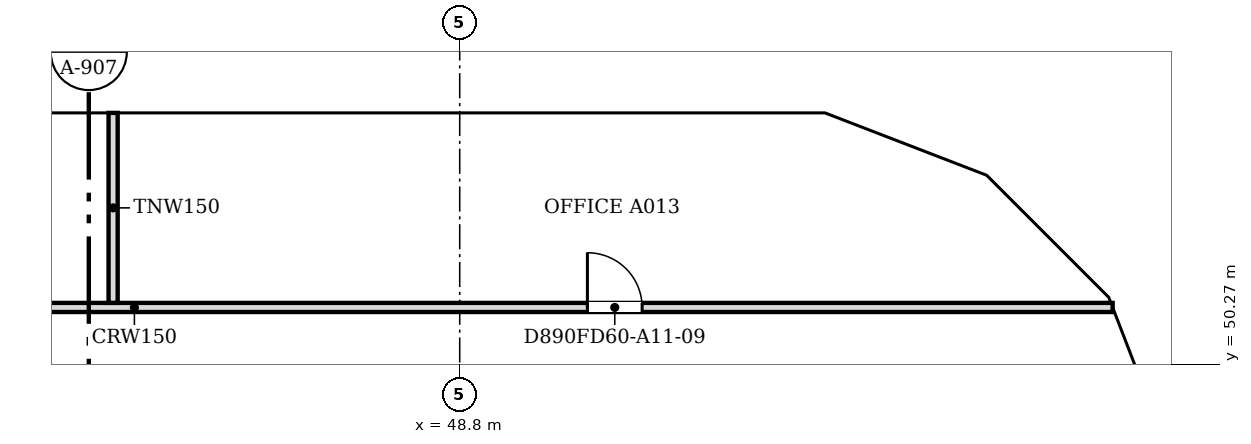
"""IFC4 building model, lengths in metres.
Left out: names, types, materials, properties, quantities, classifications, styles, units other than length and angle.
Written with IfcOpenShell. Run it as: python <this file> out.ifc"""

import sys

from ifc_helpers import new_model, si_unit, direction, frame, frame_2d, origin, place, context, subcontext, project, spatial, polyline, rectangle, outline, extrude, faceted_brep, source, transform, mapped, element, fill, save


model = new_model("IFC4")
c1 = context("Model", 3, precision=1e-05, world=origin(), true_north=direction((0.0, 1.0)))
c2 = subcontext(c1, "Body", "Model", "MODEL_VIEW")
j1 = project(units=[si_unit("LENGTHUNIT", "METRE"), si_unit("PLANEANGLEUNIT", "RADIAN")], contexts=[c1])
p1 = place(None, origin())
s1 = spatial("IfcSite", under=j1, at=p1, CompositionType="ELEMENT")
p2 = place(p1, origin())
s2 = spatial("IfcBuilding", under=s1, at=p2, CompositionType="ELEMENT")
p3 = place(p2, frame((0.0, 0.0, 124.0)))
s3 = spatial("IfcBuildingStorey", under=s2, at=p3, CompositionType="ELEMENT", Elevation=124.0)
m1 = source(origin(), c2, "Body", "Brep", [
    faceted_brep([(0.047, -0.25, 0.0), (2.997, -0.25, 3.8), (0.047, -0.25, 7.6), (0.0, -0.25, 7.541), (0.0, -0.25, 0.059), (0.093, 0.25, 7.54), (2.944, 0.25, 3.868), (2.944, 0.25, 3.732), (0.093, 0.25, 0.06), (2.997, 0.0, 3.8), (0.047, 0.0, 0.0), (0.047, 0.0, 7.6)], [[[0, 1, 2, 3, 4]], [[5, 6, 7, 8]], [[8, 7, 9, 1, 0, 10]], [[6, 5, 11, 2, 1, 9]], [[3, 2, 11]], [[10, 0, 4]], [[8, 10, 4, 3, 11, 5]], [[9, 7, 6]]]),
])
p4 = place(p3, frame((60.767, 48.71, -3.8), z_axis=(0.0, 0.0, 1.0), x_axis=(-0.359901446078, 0.932990326376, 0.0)))
e1 = element("IfcWall", 1, at=p4, inside=s3, PredefinedType="SOLIDWALL", context=c2, shape_type="MappedRepresentation", body=[
    mapped(m1, transform((0.0, 0.0, 0.0), scale=1.0)),
])
m2 = source(origin(), c2, "Body", "SweptSolid", [
    extrude(outline(polyline([(0.247, 0.665), (2.681, 3.8), (0.247, 6.935), (0.247, 0.665)])), frame((0.0, 0.26, 0.0), z_axis=(0.0, -1.0, 0.0), x_axis=(1.0, 0.0, 0.0)), (0.0, 0.0, 1.0), 0.52),
])
p5 = place(p4, origin())
e2 = element("IfcOpeningElement", 2, at=p5, cuts=e1, PredefinedType="OPENING", context=c2, shape_type="MappedRepresentation", body=[
    mapped(m2, transform((0.0, 0.0, 0.0), scale=1.0)),
])
m3 = source(origin(), c2, "Body", "Brep", [
    faceted_brep([(2.944, -0.25, 0.0), (2.997, -0.25, 0.068), (2.997, -0.25, 7.532), (2.944, -0.25, 7.6), (0.0, -0.25, 3.8), (0.053, 0.25, 3.868), (2.891, 0.25, 7.532), (2.891, 0.25, 0.068), (0.053, 0.25, 3.732), (2.944, 0.0, 0.0), (2.944, 0.0, 7.6), (0.0, 0.0, 3.8)], [[[0, 1, 2, 3, 4]], [[5, 6, 7, 8]], [[1, 0, 9]], [[10, 3, 2]], [[6, 5, 11, 4, 3, 10]], [[8, 7, 9, 0, 4, 11]], [[8, 11, 5]], [[1, 9, 7, 6, 10, 2]]]),
])
p6 = place(p3, frame((59.688, 51.506, -3.8), z_axis=(0.0, 0.0, 1.0), x_axis=(-0.707106781187, 0.707106781187, 0.0)))
e3 = element("IfcWall", 3, at=p6, inside=s3, PredefinedType="SOLIDWALL", context=c2, shape_type="MappedRepresentation", body=[
    mapped(m3, transform((0.0, 0.0, 0.0), scale=1.0)),
])
m4 = source(origin(), c2, "Body", "SweptSolid", [
    extrude(outline(polyline([(2.744, 6.934), (0.316, 3.8), (2.744, 0.666), (2.744, 6.934)])), frame((0.0, 0.26, 0.0), z_axis=(0.0, -1.0, 0.0), x_axis=(1.0, 0.0, 0.0)), (0.0, 0.0, 1.0), 0.52),
])
p7 = place(p6, origin())
e4 = element("IfcOpeningElement", 4, at=p7, cuts=e3, PredefinedType="OPENING", context=c2, shape_type="MappedRepresentation", body=[
    mapped(m4, transform((0.0, 0.0, 0.0), scale=1.0)),
])
m5 = source(origin(), c2, "Body", "Brep", [
    faceted_brep([(0.053, -0.25, 0.0), (3.003, -0.25, 3.8), (0.053, -0.25, 7.6), (0.0, -0.25, 7.532), (0.0, -0.25, 0.068), (0.106, 0.25, 7.532), (2.957, 0.25, 3.86), (2.957, 0.25, 3.74), (0.106, 0.25, 0.068), (3.003, 0.0, 3.8), (0.053, 0.0, 0.0), (0.053, 0.0, 7.6)], [[[0, 1, 2, 3, 4]], [[5, 6, 7, 8]], [[8, 7, 9, 1, 0, 10]], [[6, 5, 11, 2, 1, 9]], [[3, 2, 11]], [[10, 0, 4]], [[8, 10, 4, 3, 11, 5]], [[9, 7, 6]]]),
])
p8 = place(p3, frame((57.656, 53.569, -3.8), z_axis=(0.0, 0.0, 1.0), x_axis=(-0.933007896601, 0.359855894603, 0.0)))
e5 = element("IfcWall", 5, at=p8, inside=s3, PredefinedType="SOLIDWALL", context=c2, shape_type="MappedRepresentation", body=[
    mapped(m5, transform((0.0, 0.0, 0.0), scale=1.0)),
])
m6 = source(origin(), c2, "Body", "SweptSolid", [
    extrude(outline(polyline([(0.253, 0.665), (2.687, 3.8), (0.253, 6.935), (0.253, 0.665)])), frame((0.0, 0.26, 0.0), z_axis=(0.0, -1.0, 0.0), x_axis=(1.0, 0.0, 0.0)), (0.0, 0.0, 1.0), 0.52),
])
p9 = place(p8, origin())
e6 = element("IfcOpeningElement", 6, at=p9, cuts=e5, PredefinedType="OPENING", context=c2, shape_type="MappedRepresentation", body=[
    mapped(m6, transform((0.0, 0.0, 0.0), scale=1.0)),
])
m7 = source(origin(), c2, "Body", "Brep", [
    faceted_brep([(3.003, -0.25, 0.0), (6.053, -0.25, 3.8), (3.003, -0.25, 7.6), (0.0, -0.25, 3.8), (0.047, 0.25, 3.859), (3.003, 0.25, 7.6), (6.053, 0.25, 3.8), (3.003, 0.25, 0.0), (0.047, 0.25, 3.741), (0.0, 0.0, 3.8)], [[[0, 1, 2, 3]], [[4, 5, 6, 7, 8]], [[7, 6, 1, 0]], [[6, 5, 2, 1]], [[5, 4, 9, 3, 2]], [[8, 7, 0, 3, 9]], [[8, 9, 4]]]),
])
p10 = place(p3, frame((54.854, 54.65, -3.8), z_axis=(0.0, 0.0, 1.0), x_axis=(-1.0, 0.0, 0.0)))
e7 = element("IfcWall", 7, at=p10, inside=s3, PredefinedType="SOLIDWALL", context=c2, shape_type="MappedRepresentation", body=[
    mapped(m7, transform((0.0, 0.0, 0.0), scale=1.0)),
])
m8 = source(origin(), c2, "Body", "SweptSolid", [
    extrude(outline(polyline([(3.005, 0.401), (5.733, 3.8), (3.005, 7.199), (0.319, 3.8), (3.005, 0.401)])), frame((0.0, 0.26, 0.0), z_axis=(0.0, -1.0, 0.0), x_axis=(1.0, 0.0, 0.0)), (0.0, 0.0, 1.0), 0.52),
])
p11 = place(p10, origin())
e8 = element("IfcOpeningElement", 8, at=p11, cuts=e7, PredefinedType="OPENING", context=c2, shape_type="MappedRepresentation", body=[
    mapped(m8, transform((0.0, 0.0, 0.0), scale=1.0)),
])
m9 = source(origin(), c2, "Body", "SweptSolid", [
    extrude(outline(polyline([(3.05, 0.0), (6.1, 3.8), (3.05, 7.6), (0.0, 3.8), (3.05, 0.0)])), frame((0.0, 0.25, 0.0), z_axis=(0.0, -1.0, 0.0), x_axis=(1.0, 0.0, 0.0)), (0.0, 0.0, 1.0), 0.5),
])
p12 = place(p3, frame((48.8, 54.65, -3.8), z_axis=(0.0, 0.0, 1.0), x_axis=(-1.0, 0.0, 0.0)))
e9 = element("IfcWall", 9, at=p12, inside=s3, PredefinedType="SOLIDWALL", context=c2, shape_type="MappedRepresentation", body=[
    mapped(m9, transform((0.0, 0.0, 0.0), scale=1.0)),
])
m10 = source(origin(), c2, "Body", "SweptSolid", [
    extrude(outline(polyline([(3.05, 0.399), (5.78, 3.8), (3.05, 7.201), (0.321, 3.8), (3.05, 0.399)])), frame((0.0, 0.26, 0.0), z_axis=(0.0, -1.0, 0.0), x_axis=(1.0, 0.0, 0.0)), (0.0, 0.0, 1.0), 0.52),
])
p13 = place(p12, origin())
e10 = element("IfcOpeningElement", 10, at=p13, cuts=e9, PredefinedType="OPENING", context=c2, shape_type="MappedRepresentation", body=[
    mapped(m10, transform((0.0, 0.0, 0.0), scale=1.0)),
])
m11 = source(origin(), c2, "Body", "Brep", [
    faceted_brep([(3.05, -0.25, 0.0), (6.1, -0.25, 3.8), (6.1, -0.25, 3.8), (3.05, -0.25, 7.6), (0.0, -0.25, 3.8), (0.0, 0.25, 3.8), (3.05, 0.25, 7.6), (6.1, 0.25, 3.8), (6.1, 0.25, 3.8), (3.05, 0.25, 0.0)], [[[0, 1, 2, 3, 4]], [[5, 6, 7, 8, 9]], [[9, 8, 1, 0]], [[7, 6, 3, 2]], [[6, 5, 4, 3]], [[5, 9, 0, 4]], [[1, 8, 7, 2]]]),
])
p14 = place(p3, frame((42.7, 54.65, -3.8), z_axis=(0.0, 0.0, 1.0), x_axis=(-1.0, 0.0, 0.0)))
e11 = element("IfcWall", 11, at=p14, inside=s3, PredefinedType="SOLIDWALL", context=c2, shape_type="MappedRepresentation", body=[
    mapped(m11, transform((0.0, 0.0, 0.0), scale=1.0)),
])
p15 = place(p14, origin())
e12 = element("IfcOpeningElement", 12, at=p15, cuts=e11, PredefinedType="OPENING", context=c2, shape_type="MappedRepresentation", body=[
    mapped(m10, transform((0.0, 0.0, 0.0), scale=1.0)),
])
p16 = place(p2, frame((0.0, 0.0, 127.8)))
s4 = spatial("IfcBuildingStorey", under=s2, at=p16, CompositionType="ELEMENT", Elevation=127.8)
m12 = source(origin(), c2, "Body", "Brep", [
    faceted_brep([(2.95, -0.25, 0.0), (3.003, -0.25, 0.068), (3.003, -0.25, 7.532), (2.95, -0.25, 7.6), (0.0, -0.25, 3.8), (0.047, 0.25, 3.86), (2.898, 0.25, 7.532), (2.898, 0.25, 0.068), (0.047, 0.25, 3.74), (2.95, 0.0, 0.0), (2.95, 0.0, 7.6), (0.0, 0.0, 3.8)], [[[0, 1, 2, 3, 4]], [[5, 6, 7, 8]], [[1, 0, 9]], [[10, 3, 2]], [[6, 5, 11, 4, 3, 10]], [[8, 7, 9, 0, 4, 11]], [[8, 11, 5]], [[1, 9, 7, 6, 10, 2]]]),
])
p17 = place(p16, frame((60.75, 48.753, -3.8), z_axis=(0.0, 0.0, 1.0), x_axis=(-0.35992665181, 0.932980602862, 0.0)))
e13 = element("IfcWall", 13, at=p17, inside=s4, PredefinedType="SOLIDWALL", context=c2, shape_type="MappedRepresentation", body=[
    mapped(m12, transform((0.0, 0.0, 0.0), scale=1.0)),
])
m13 = source(origin(), c2, "Body", "SweptSolid", [
    extrude(outline(polyline([(2.75, 6.935), (0.316, 3.8), (2.75, 0.665), (2.75, 6.935)])), frame((0.0, 0.26, 0.0), z_axis=(0.0, -1.0, 0.0), x_axis=(1.0, 0.0, 0.0)), (0.0, 0.0, 1.0), 0.52),
])
p18 = place(p17, origin())
e14 = element("IfcOpeningElement", 14, at=p18, cuts=e13, PredefinedType="OPENING", context=c2, shape_type="MappedRepresentation", body=[
    mapped(m13, transform((0.0, 0.0, 0.0), scale=1.0)),
])
m14 = source(origin(), c2, "Body", "Brep", [
    faceted_brep([(0.053, -0.25, 0.0), (2.997, -0.25, 3.8), (0.053, -0.25, 7.6), (0.0, -0.25, 7.532), (0.0, -0.25, 0.068), (0.106, 0.25, 7.532), (2.944, 0.25, 3.868), (2.944, 0.25, 3.732), (0.106, 0.25, 0.068), (2.997, 0.0, 3.8), (0.053, 0.0, 0.0), (0.053, 0.0, 7.6)], [[[0, 1, 2, 3, 4]], [[5, 6, 7, 8]], [[8, 7, 9, 1, 0, 10]], [[6, 5, 11, 2, 1, 9]], [[3, 2, 11]], [[10, 0, 4]], [[8, 10, 4, 3, 11, 5]], [[9, 7, 6]]]),
])
p19 = place(p16, frame((59.726, 51.469, -3.8), z_axis=(0.0, 0.0, 1.0), x_axis=(-0.707106781187, 0.707106781187, 0.0)))
e15 = element("IfcWall", 15, at=p19, inside=s4, PredefinedType="SOLIDWALL", context=c2, shape_type="MappedRepresentation", body=[
    mapped(m14, transform((0.0, 0.0, 0.0), scale=1.0)),
])
m15 = source(origin(), c2, "Body", "SweptSolid", [
    extrude(outline(polyline([(0.253, 0.666), (2.681, 3.8), (0.253, 6.934), (0.253, 0.666)])), frame((0.0, 0.26, 0.0), z_axis=(0.0, -1.0, 0.0), x_axis=(1.0, 0.0, 0.0)), (0.0, 0.0, 1.0), 0.52),
])
p20 = place(p19, origin())
e16 = element("IfcOpeningElement", 16, at=p20, cuts=e15, PredefinedType="OPENING", context=c2, shape_type="MappedRepresentation", body=[
    mapped(m15, transform((0.0, 0.0, 0.0), scale=1.0)),
])
m16 = source(origin(), c2, "Body", "Brep", [
    faceted_brep([(2.95, -0.25, 0.0), (2.997, -0.25, 0.059), (2.997, -0.25, 7.541), (2.95, -0.25, 7.6), (0.0, -0.25, 3.8), (0.053, 0.25, 3.868), (2.904, 0.25, 7.54), (2.904, 0.25, 0.06), (0.053, 0.25, 3.732), (2.95, 0.0, 0.0), (2.95, 0.0, 7.6), (0.0, 0.0, 3.8)], [[[0, 1, 2, 3, 4]], [[5, 6, 7, 8]], [[1, 0, 9]], [[10, 3, 2]], [[6, 5, 11, 4, 3, 10]], [[8, 7, 9, 0, 4, 11]], [[8, 11, 5]], [[1, 9, 7, 6, 10, 2]]]),
])
p21 = place(p16, frame((57.606, 53.588, -3.8), z_axis=(0.0, 0.0, 1.0), x_axis=(-0.932990326376, 0.359901446078, 0.0)))
e17 = element("IfcWall", 17, at=p21, inside=s4, PredefinedType="SOLIDWALL", context=c2, shape_type="MappedRepresentation", body=[
    mapped(m16, transform((0.0, 0.0, 0.0), scale=1.0)),
])
p22 = place(p21, origin())
e18 = element("IfcOpeningElement", 18, at=p22, cuts=e17, PredefinedType="OPENING", context=c2, shape_type="MappedRepresentation", body=[
    mapped(m13, transform((0.0, 0.0, 0.0), scale=1.0)),
])
m17 = source(origin(), c2, "Body", "Brep", [
    faceted_brep([(0.047, -0.25, 0.0), (3.05, -0.25, 3.8), (0.047, -0.25, 7.6), (0.0, -0.25, 7.54), (0.0, -0.25, 0.06), (0.093, 0.25, 7.541), (3.05, 0.25, 3.8), (0.093, 0.25, 0.059), (0.047, 0.0, 0.0), (0.047, 0.0, 7.6)], [[[0, 1, 2, 3, 4]], [[5, 6, 7]], [[7, 6, 1, 0, 8]], [[6, 5, 9, 2, 1]], [[3, 2, 9]], [[8, 0, 4]], [[7, 8, 4, 3, 9, 5]]]),
])
p23 = place(p16, frame((54.9, 54.65, -3.8), z_axis=(0.0, 0.0, 1.0), x_axis=(-1.0, 0.0, 0.0)))
e19 = element("IfcWall", 19, at=p23, inside=s4, PredefinedType="SOLIDWALL", context=c2, shape_type="MappedRepresentation", body=[
    mapped(m17, transform((0.0, 0.0, 0.0), scale=1.0)),
])
m18 = source(origin(), c2, "Body", "SweptSolid", [
    extrude(outline(polyline([(0.247, 0.656), (2.731, 3.8), (0.247, 6.944), (0.247, 0.656)])), frame((0.0, 0.26, 0.0), z_axis=(0.0, -1.0, 0.0), x_axis=(1.0, 0.0, 0.0)), (0.0, 0.0, 1.0), 0.52),
])
p24 = place(p23, origin())
e20 = element("IfcOpeningElement", 20, at=p24, cuts=e19, PredefinedType="OPENING", context=c2, shape_type="MappedRepresentation", body=[
    mapped(m18, transform((0.0, 0.0, 0.0), scale=1.0)),
])
p25 = place(p16, frame((51.85, 54.65, -3.8), z_axis=(0.0, 0.0, 1.0), x_axis=(-1.0, 0.0, 0.0)))
e21 = element("IfcWall", 21, at=p25, inside=s4, PredefinedType="SOLIDWALL", context=c2, shape_type="MappedRepresentation", body=[
    mapped(m9, transform((0.0, 0.0, 0.0), scale=1.0)),
])
p26 = place(p25, origin())
e22 = element("IfcOpeningElement", 22, at=p26, cuts=e21, PredefinedType="OPENING", context=c2, shape_type="MappedRepresentation", body=[
    mapped(m10, transform((0.0, 0.0, 0.0), scale=1.0)),
])
p27 = place(p16, frame((45.75, 54.65, -3.8), z_axis=(0.0, 0.0, 1.0), x_axis=(-1.0, 0.0, 0.0)))
e23 = element("IfcWall", 23, at=p27, inside=s4, PredefinedType="SOLIDWALL", context=c2, shape_type="MappedRepresentation", body=[
    mapped(m9, transform((0.0, 0.0, 0.0), scale=1.0)),
])
p28 = place(p27, origin())
e24 = element("IfcOpeningElement", 24, at=p28, cuts=e23, PredefinedType="OPENING", context=c2, shape_type="MappedRepresentation", body=[
    mapped(m10, transform((0.0, 0.0, 0.0), scale=1.0)),
])
p29 = place(p3, frame((28.1, 51.2, 0.0), z_axis=(0.0, 0.0, 1.0), x_axis=(1.0, 0.0, 0.0)))
e25 = element("IfcWall", 25, at=p29, inside=s3, PredefinedType="PARTITIONING", context=c2, shape_type="SweptSolid", body=[
    extrude(rectangle(XDim=31.438, YDim=0.15, at=frame_2d((15.719, 0.0))), origin(), (0.0, 0.0, 1.0), 3.067),
])
m19 = source(origin(), c2, "Body", "SweptSolid", [
    extrude(rectangle(XDim=0.9, YDim=2.1, at=frame_2d((0.45, 1.05))), frame((0.0, 0.085, 0.0), z_axis=(0.0, -1.0, 0.0), x_axis=(1.0, 0.0, 0.0)), (0.0, 0.0, 1.0), 0.17),
])
p30 = place(p29, frame((7.0, 0.0, 0.0)))
e26 = element("IfcOpeningElement", 26, at=p30, cuts=e25, PredefinedType="OPENING", context=c2, shape_type="MappedRepresentation", body=[
    mapped(m19, transform((0.0, 0.0, 0.0), scale=1.0)),
])
p31 = place(p29, frame((22.8, 0.0, 0.0)))
e27 = element("IfcOpeningElement", 27, at=p31, cuts=e25, PredefinedType="OPENING", context=c2, shape_type="MappedRepresentation", body=[
    mapped(m19, transform((0.0, 0.0, 0.0), scale=1.0)),
])
p32 = place(p3, frame((43.1, 51.276, 0.0), z_axis=(0.0, 0.0, 1.0), x_axis=(0.0, 1.0, 0.0)))
e28 = element("IfcWall", 28, at=p32, inside=s3, PredefinedType="PARTITIONING", context=c2, shape_type="SweptSolid", body=[
    extrude(rectangle(XDim=3.124, YDim=0.15, at=frame_2d((1.562, 0.0))), origin(), (0.0, 0.0, 1.0), 3.067),
])
m20 = source(origin(), c2, "Body", "SweptSolid", [
    extrude(rectangle(XDim=0.9, YDim=2.1, at=frame_2d((0.45, 1.05))), frame((0.0, 0.025, 0.0), z_axis=(0.0, -1.0, 0.0), x_axis=(1.0, 0.0, 0.0)), (0.0, 0.0, 1.0), 0.05),
])
p33 = place(p31, origin())
e29 = element("IfcDoor", 29, at=p33, inside=s3, OperationType="SINGLE_SWING_LEFT", PredefinedType="DOOR", context=c2, shape_type="MappedRepresentation", body=[
    mapped(m20, transform((0.0, 0.0, 0.0), scale=1.0)),
])
fill(e27, e29)
save(model, sys.argv[1])
